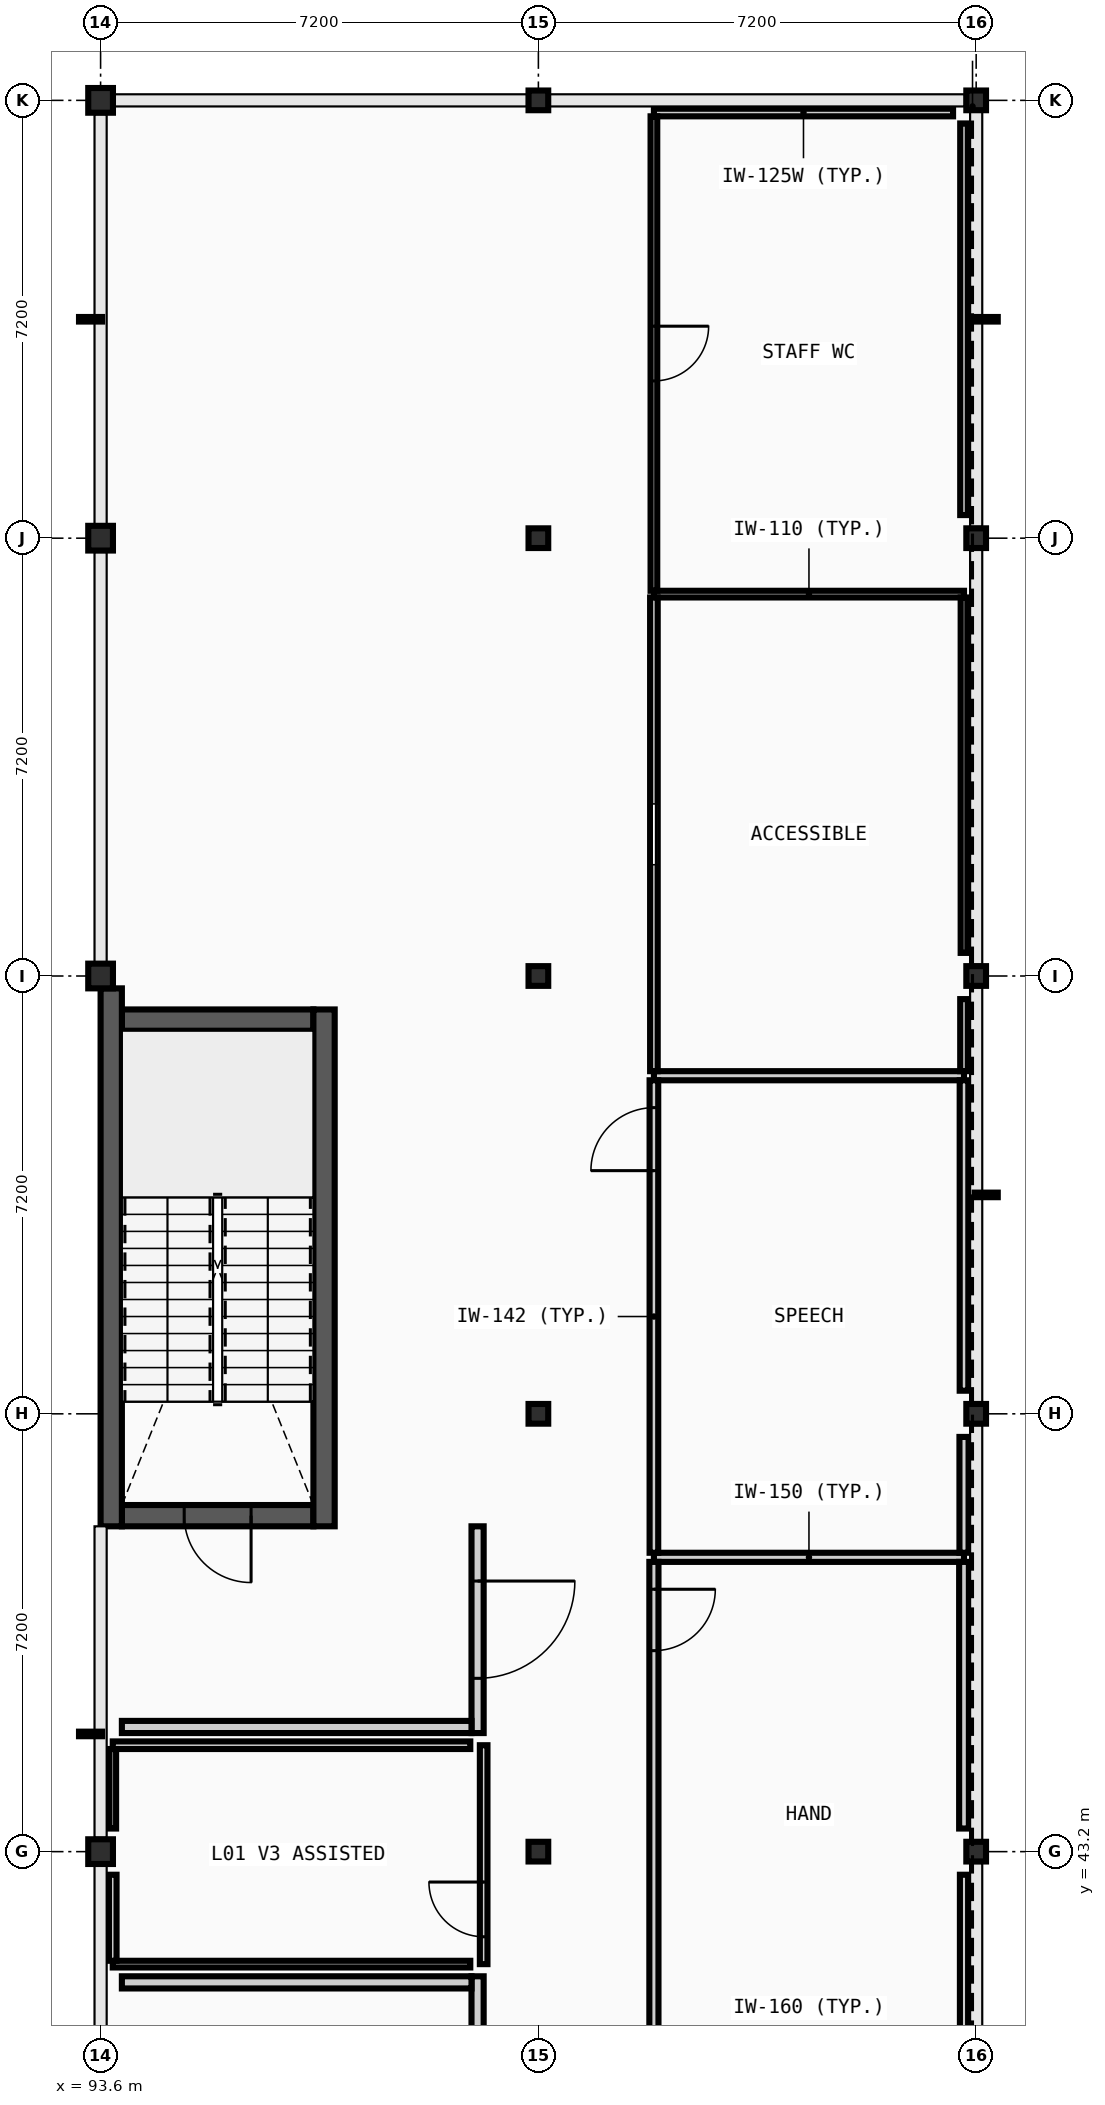
"""IFC4 building model, lengths in metres.
Left out: names, types, materials, properties, quantities, classifications, styles, units other than length and angle.
Written with IfcOpenShell. Run it as: python <this file> out.ifc"""

import sys

from ifc_helpers import new_model, si_unit, direction, frame, frame_2d, origin, origin_2d, place, context, subcontext, project, spatial, rectangle, hollow_circle, extrude, element, fill, save


model = new_model("IFC4")
c1 = context("Model", 3, precision=1e-05, world=origin(), true_north=direction((0.0, 1.0)))
c2 = subcontext(c1, "Body", "Model", "MODEL_VIEW")
j1 = project(units=[si_unit("LENGTHUNIT", "METRE"), si_unit("PLANEANGLEUNIT", "RADIAN")], contexts=[c1])
p1 = place(None, origin())
s1 = spatial("IfcSite", under=j1, at=p1, CompositionType="ELEMENT")
p2 = place(p1, origin())
s2 = spatial("IfcBuilding", under=s1, at=p2, CompositionType="ELEMENT")
p3 = place(p2, frame((0.0, 0.0, 5.2)))
s3 = spatial("IfcBuildingStorey", under=s2, at=p3, CompositionType="ELEMENT", Elevation=5.2)
for number, where, z_axis, x_axis in (
    (1, (93.6, 43.2, 0.0), (0.0, 0.0, 1.0), (1.0, 0.0, 0.0)),
    (2, (93.6, 57.6, 0.0), (0.0, 0.0, 1.0), (1.0, 0.0, 0.0)),
    (3, (93.6, 64.8, 0.0), (0.0, 0.0, 1.0), (1.0, 0.0, 0.0)),
    (4, (93.6, 72.0, 0.0), (0.0, 0.0, 1.0), (1.0, 0.0, 0.0)),
):
    element("IfcColumn", number, at=place(p3, frame(where, z_axis=z_axis, x_axis=x_axis)), inside=s3, PredefinedType="COLUMN", context=c2, shape_type="SweptSolid", body=[
        extrude(hollow_circle(Radius=0.203, WallThickness=0.016, at=origin_2d()), origin(), (0.0, 0.0, 1.0), 4.4),
    ])
for number, where, z_axis, x_axis in (
    (5, (100.8, 43.2, 0.0), (0.0, 0.0, 1.0), (1.0, 0.0, 0.0)),
    (6, (100.8, 50.4, 0.0), (0.0, 0.0, 1.0), (1.0, 0.0, 0.0)),
    (7, (100.8, 57.6, 0.0), (0.0, 0.0, 1.0), (1.0, 0.0, 0.0)),
    (8, (100.8, 64.8, 0.0), (0.0, 0.0, 1.0), (1.0, 0.0, 0.0)),
    (9, (100.8, 72.0, 0.0), (0.0, 0.0, 1.0), (1.0, 0.0, 0.0)),
    (10, (108.0, 43.2, 0.0), (0.0, 0.0, 1.0), (1.0, 0.0, 0.0)),
    (11, (108.0, 50.4, 0.0), (0.0, 0.0, 1.0), (1.0, 0.0, 0.0)),
    (12, (108.0, 57.6, 0.0), (0.0, 0.0, 1.0), (1.0, 0.0, 0.0)),
    (13, (108.0, 64.8, 0.0), (0.0, 0.0, 1.0), (1.0, 0.0, 0.0)),
    (14, (108.0, 72.0, 0.0), (0.0, 0.0, 1.0), (1.0, 0.0, 0.0)),
):
    element("IfcColumn", number, at=place(p3, frame(where, z_axis=z_axis, x_axis=x_axis)), inside=s3, PredefinedType="COLUMN", context=c2, shape_type="SweptSolid", body=[
        extrude(hollow_circle(Radius=0.162, WallThickness=0.012, at=origin_2d()), origin(), (0.0, 0.0, 1.0), 4.4),
    ])
p4 = place(p3, frame((99.8, 37.75, 0.0), z_axis=(0.0, 0.0, 1.0), x_axis=(0.0, 1.0, 0.0)))
e15 = element("IfcWall", 15, at=p4, inside=s3, PredefinedType="PARTITIONING", context=c2, shape_type="SweptSolid", body=[
    extrude(rectangle(XDim=3.4, YDim=0.2, at=frame_2d((1.7, 0.0))), origin(), (0.0, 0.0, 1.0), 4.185),
])
p5 = place(p4, frame((0.9, 0.0, 0.0)))
e16 = element("IfcOpeningElement", 16, at=p5, cuts=e15, PredefinedType="OPENING", context=c2, shape_type="SweptSolid", body=[
    extrude(rectangle(XDim=1.6, YDim=2.2, at=frame_2d((0.8, 1.1))), frame((0.0, 0.11, 0.0), z_axis=(0.0, -1.0, 0.0), x_axis=(1.0, 0.0, 0.0)), (0.0, 0.0, 1.0), 0.22),
])
p6 = place(p3, frame((93.95, 41.05, 0.0), z_axis=(0.0, 0.0, 1.0), x_axis=(1.0, 0.0, 0.0)))
e17 = element("IfcWall", 17, at=p6, inside=s3, PredefinedType="PARTITIONING", context=c2, shape_type="SweptSolid", body=[
    extrude(rectangle(XDim=5.75, YDim=0.2, at=frame_2d((2.875, 0.0))), origin(), (0.0, 0.0, 1.0), 4.185),
])
p7 = place(p3, frame((93.95, 48.725, 0.0), z_axis=(0.0, 0.0, 1.0), x_axis=(1.0, 0.0, 0.0)))
e18 = element("IfcWall", 18, at=p7, inside=s3, PredefinedType="SHEAR", context=c2, shape_type="SweptSolid", body=[
    extrude(rectangle(XDim=3.15, YDim=0.35, at=frame_2d((1.575, 0.0))), origin(), (0.0, 0.0, 1.0), 4.185),
])
p8 = place(p7, frame((1.025, 0.0, 0.0)))
e19 = element("IfcOpeningElement", 19, at=p8, cuts=e18, PredefinedType="OPENING", context=c2, shape_type="SweptSolid", body=[
    extrude(rectangle(XDim=1.1, YDim=2.15, at=frame_2d((0.55, 1.075))), frame((0.0, 0.185, 0.0), z_axis=(0.0, -1.0, 0.0), x_axis=(1.0, 0.0, 0.0)), (0.0, 0.0, 1.0), 0.37),
])
p9 = place(p3, frame((93.95, 56.875, 0.0), z_axis=(0.0, 0.0, 1.0), x_axis=(1.0, 0.0, 0.0)))
e20 = element("IfcWall", 20, at=p9, inside=s3, PredefinedType="SHEAR", context=c2, shape_type="SweptSolid", body=[
    extrude(rectangle(XDim=3.15, YDim=0.35, at=frame_2d((1.575, 0.0))), origin(), (0.0, 0.0, 1.0), 4.185),
])
p10 = place(p3, frame((93.775, 48.55, 0.0), z_axis=(0.0, 0.0, 1.0), x_axis=(0.0, 1.0, 0.0)))
e21 = element("IfcWall", 21, at=p10, inside=s3, PredefinedType="SHEAR", context=c2, shape_type="SweptSolid", body=[
    extrude(rectangle(XDim=8.847, YDim=0.35, at=frame_2d((4.423, 0.0))), origin(), (0.0, 0.0, 1.0), 4.185),
])
p11 = place(p3, frame((97.275, 48.55, 0.0), z_axis=(0.0, 0.0, 1.0), x_axis=(0.0, 1.0, 0.0)))
e22 = element("IfcWall", 22, at=p11, inside=s3, PredefinedType="SHEAR", context=c2, shape_type="SweptSolid", body=[
    extrude(rectangle(XDim=8.5, YDim=0.35, at=frame_2d((4.25, 0.0))), origin(), (0.0, 0.0, 1.0), 4.185),
])
p12 = place(p3, frame((99.8, 45.15, 0.0), z_axis=(0.0, 0.0, 1.0), x_axis=(0.0, 1.0, 0.0)))
e23 = element("IfcWall", 23, at=p12, inside=s3, PredefinedType="PARTITIONING", context=c2, shape_type="SweptSolid", body=[
    extrude(rectangle(XDim=3.4, YDim=0.2, at=frame_2d((1.7, 0.0))), origin(), (0.0, 0.0, 1.0), 4.185),
])
p13 = place(p12, frame((0.9, 0.0, 0.0)))
e24 = element("IfcOpeningElement", 24, at=p13, cuts=e23, PredefinedType="OPENING", context=c2, shape_type="SweptSolid", body=[
    extrude(rectangle(XDim=1.6, YDim=2.2, at=frame_2d((0.8, 1.1))), frame((0.0, 0.11, 0.0), z_axis=(0.0, -1.0, 0.0), x_axis=(1.0, 0.0, 0.0)), (0.0, 0.0, 1.0), 0.22),
])
p14 = place(p3, frame((93.95, 45.25, 0.0), z_axis=(0.0, 0.0, 1.0), x_axis=(1.0, 0.0, 0.0)))
e25 = element("IfcWall", 25, at=p14, inside=s3, PredefinedType="PARTITIONING", context=c2, shape_type="SweptSolid", body=[
    extrude(rectangle(XDim=5.75, YDim=0.2, at=frame_2d((2.875, 0.0))), origin(), (0.0, 0.0, 1.0), 4.185),
])
p15 = place(p3, frame((93.8, 41.35, 0.0), z_axis=(0.0, 0.0, 1.0), x_axis=(1.0, 0.0, 0.0)))
e26 = element("IfcWall", 26, at=p15, inside=s3, PredefinedType="PARTITIONING", context=c2, shape_type="SweptSolid", body=[
    extrude(rectangle(XDim=5.88, YDim=0.11, at=frame_2d((2.94, 0.0))), origin(), (0.0, 0.0, 1.0), 4.185),
])
p16 = place(p3, frame((93.8, 44.95, 0.0), z_axis=(0.0, 0.0, 1.0), x_axis=(1.0, 0.0, 0.0)))
e27 = element("IfcWall", 27, at=p16, inside=s3, PredefinedType="PARTITIONING", context=c2, shape_type="SweptSolid", body=[
    extrude(rectangle(XDim=5.88, YDim=0.125, at=frame_2d((2.94, 0.0))), origin(), (0.0, 0.0, 1.0), 4.185),
])
for number, where, z_axis, x_axis in (
    (28, (102.7, 48.04, 0.0), (0.0, 0.0, 1.0), (1.0, 0.0, 0.0)),
    (29, (102.7, 55.96, 0.0), (0.0, 0.0, 1.0), (1.0, 0.0, 0.0)),
):
    element("IfcWall", number, at=place(p3, frame(where, z_axis=z_axis, x_axis=x_axis)), inside=s3, PredefinedType="PARTITIONING", context=c2, shape_type="SweptSolid", body=[
        extrude(rectangle(XDim=5.1, YDim=0.15, at=frame_2d((2.55, 0.0))), origin(), (0.0, 0.0, 1.0), 4.185),
    ])
p17 = place(p3, frame((102.7, 63.88, 0.0), z_axis=(0.0, 0.0, 1.0), x_axis=(1.0, 0.0, 0.0)))
e30 = element("IfcWall", 30, at=p17, inside=s3, PredefinedType="PARTITIONING", context=c2, shape_type="SweptSolid", body=[
    extrude(rectangle(XDim=5.1, YDim=0.11, at=frame_2d((2.55, 0.0))), origin(), (0.0, 0.0, 1.0), 4.185),
])
p18 = place(p3, frame((102.7, 71.8, 0.0), z_axis=(0.0, 0.0, 1.0), x_axis=(1.0, 0.0, 0.0)))
e31 = element("IfcWall", 31, at=p18, inside=s3, PredefinedType="PARTITIONING", context=c2, shape_type="SweptSolid", body=[
    extrude(rectangle(XDim=4.92, YDim=0.125, at=frame_2d((2.46, 0.0))), origin(), (0.0, 0.0, 1.0), 4.185),
])
p19 = place(p3, frame((93.8, 41.405, 0.0), z_axis=(0.0, 0.0, 1.0), x_axis=(0.0, 1.0, 0.0)))
e32 = element("IfcWall", 32, at=p19, inside=s3, PredefinedType="PARTITIONING", context=c2, shape_type="SweptSolid", body=[
    extrude(rectangle(XDim=1.415, YDim=0.125, at=frame_2d((0.708, 0.0))), origin(), (0.0, 0.0, 1.0), 4.185),
])
p20 = place(p3, frame((93.8, 43.58, 0.0), z_axis=(0.0, 0.0, 1.0), x_axis=(0.0, 1.0, 0.0)))
e33 = element("IfcWall", 33, at=p20, inside=s3, PredefinedType="PARTITIONING", context=c2, shape_type="SweptSolid", body=[
    extrude(rectangle(XDim=1.307, YDim=0.11, at=frame_2d((0.654, 0.0))), origin(), (0.0, 0.0, 1.0), 4.185),
])
p21 = place(p3, frame((99.9, 41.35, 0.0), z_axis=(0.0, 0.0, 1.0), x_axis=(0.0, 1.0, 0.0)))
e34 = element("IfcWall", 34, at=p21, inside=s3, PredefinedType="PARTITIONING", context=c2, shape_type="SweptSolid", body=[
    extrude(rectangle(XDim=3.6, YDim=0.125, at=frame_2d((1.8, 0.0))), origin(), (0.0, 0.0, 1.0), 4.185),
])
p22 = place(p21, frame((0.45, 0.0, 0.0)))
e35 = element("IfcOpeningElement", 35, at=p22, cuts=e34, PredefinedType="OPENING", context=c2, shape_type="SweptSolid", body=[
    extrude(rectangle(XDim=0.9, YDim=2.1, at=frame_2d((0.45, 1.05))), frame((0.0, 0.073, 0.0), z_axis=(0.0, -1.0, 0.0), x_axis=(1.0, 0.0, 0.0)), (0.0, 0.0, 1.0), 0.145),
])
p23 = place(p3, frame((102.7, 39.65, 0.0), z_axis=(0.0, 0.0, 1.0), x_axis=(0.0, 1.0, 0.0)))
e36 = element("IfcWall", 36, at=p23, inside=s3, PredefinedType="PARTITIONING", context=c2, shape_type="SweptSolid", body=[
    extrude(rectangle(XDim=8.315, YDim=0.15, at=frame_2d((4.158, 0.0))), origin(), (0.0, 0.0, 1.0), 4.185),
])
p24 = place(p23, frame((6.855, 0.0, 0.0)))
e37 = element("IfcOpeningElement", 37, at=p24, cuts=e36, PredefinedType="OPENING", context=c2, shape_type="SweptSolid", body=[
    extrude(rectangle(XDim=1.01, YDim=2.124, at=frame_2d((0.505, 1.062))), frame((0.0, 0.085, 0.0), z_axis=(0.0, -1.0, 0.0), x_axis=(1.0, 0.0, 0.0)), (0.0, 0.0, 1.0), 0.17),
])
p25 = place(p3, frame((102.7, 48.115, 0.0), z_axis=(0.0, 0.0, 1.0), x_axis=(0.0, 1.0, 0.0)))
e38 = element("IfcWall", 38, at=p25, inside=s3, PredefinedType="PARTITIONING", context=c2, shape_type="SweptSolid", body=[
    extrude(rectangle(XDim=7.77, YDim=0.142, at=frame_2d((3.885, 0.0))), origin(), (0.0, 0.0, 1.0), 4.185),
])
p26 = place(p25, frame((6.284, 0.0, 0.0)))
e39 = element("IfcOpeningElement", 39, at=p26, cuts=e38, PredefinedType="OPENING", context=c2, shape_type="SweptSolid", body=[
    extrude(rectangle(XDim=1.036, YDim=2.124, at=frame_2d((0.518, 1.062))), frame((0.0, 0.081, 0.0), z_axis=(0.0, -1.0, 0.0), x_axis=(1.0, 0.0, 0.0)), (0.0, 0.0, 1.0), 0.162),
])
p27 = place(p3, frame((102.7, 56.035, 0.0), z_axis=(0.0, 0.0, 1.0), x_axis=(0.0, 1.0, 0.0)))
e40 = element("IfcWall", 40, at=p27, inside=s3, PredefinedType="PARTITIONING", context=c2, shape_type="SweptSolid", body=[
    extrude(rectangle(XDim=7.79, YDim=0.125, at=frame_2d((3.895, 0.0))), origin(), (0.0, 0.0, 1.0), 4.185),
])
p28 = place(p27, frame((3.395, 0.0, 0.0)))
e41 = element("IfcOpeningElement", 41, at=p28, cuts=e40, PredefinedType="OPENING", context=c2, shape_type="SweptSolid", body=[
    extrude(rectangle(XDim=1.0, YDim=2.1, at=frame_2d((0.5, 1.05))), frame((0.0, 0.073, 0.0), z_axis=(0.0, -1.0, 0.0), x_axis=(1.0, 0.0, 0.0)), (0.0, 0.0, 1.0), 0.145),
])
p29 = place(p3, frame((102.7, 63.935, 0.0), z_axis=(0.0, 0.0, 1.0), x_axis=(0.0, 1.0, 0.0)))
e42 = element("IfcWall", 42, at=p29, inside=s3, PredefinedType="PARTITIONING", context=c2, shape_type="SweptSolid", body=[
    extrude(rectangle(XDim=7.802, YDim=0.11, at=frame_2d((3.901, 0.0))), origin(), (0.0, 0.0, 1.0), 4.185),
])
p30 = place(p29, frame((3.451, 0.0, 0.0)))
e43 = element("IfcOpeningElement", 43, at=p30, cuts=e42, PredefinedType="OPENING", context=c2, shape_type="SweptSolid", body=[
    extrude(rectangle(XDim=0.9, YDim=2.1, at=frame_2d((0.45, 1.05))), frame((0.0, 0.065, 0.0), z_axis=(0.0, -1.0, 0.0), x_axis=(1.0, 0.0, 0.0)), (0.0, 0.0, 1.0), 0.13),
])
p31 = place(p3, frame((107.8, 39.65, 0.0), z_axis=(0.0, 0.0, 1.0), x_axis=(0.0, 1.0, 0.0)))
e44 = element("IfcWall", 44, at=p31, inside=s3, PredefinedType="PARTITIONING", context=c2, shape_type="SweptSolid", body=[
    extrude(rectangle(XDim=3.17, YDim=0.135, at=frame_2d((1.585, 0.0))), origin(), (0.0, 0.0, 1.0), 3.81),
])
p32 = place(p3, frame((107.8, 43.58, 0.0), z_axis=(0.0, 0.0, 1.0), x_axis=(0.0, 1.0, 0.0)))
e45 = element("IfcWall", 45, at=p32, inside=s3, PredefinedType="PARTITIONING", context=c2, shape_type="SweptSolid", body=[
    extrude(rectangle(XDim=4.385, YDim=0.16, at=frame_2d((2.192, 0.0))), origin(), (0.0, 0.0, 1.0), 3.81),
])
p33 = place(p3, frame((107.8, 48.115, 0.0), z_axis=(0.0, 0.0, 1.0), x_axis=(0.0, 1.0, 0.0)))
e46 = element("IfcWall", 46, at=p33, inside=s3, PredefinedType="PARTITIONING", context=c2, shape_type="SweptSolid", body=[
    extrude(rectangle(XDim=1.905, YDim=0.15, at=frame_2d((0.953, 0.0))), origin(), (0.0, 0.0, 1.0), 3.81),
])
p34 = place(p3, frame((107.8, 50.78, 0.0), z_axis=(0.0, 0.0, 1.0), x_axis=(0.0, 1.0, 0.0)))
e47 = element("IfcWall", 47, at=p34, inside=s3, PredefinedType="PARTITIONING", context=c2, shape_type="SweptSolid", body=[
    extrude(rectangle(XDim=5.105, YDim=0.142, at=frame_2d((2.552, 0.0))), origin(), (0.0, 0.0, 1.0), 3.81),
])
p35 = place(p3, frame((107.8, 56.035, 0.0), z_axis=(0.0, 0.0, 1.0), x_axis=(0.0, 1.0, 0.0)))
e48 = element("IfcWall", 48, at=p35, inside=s3, PredefinedType="PARTITIONING", context=c2, shape_type="SweptSolid", body=[
    extrude(rectangle(XDim=1.185, YDim=0.125, at=frame_2d((0.593, 0.0))), origin(), (0.0, 0.0, 1.0), 3.81),
])
p36 = place(p3, frame((107.8, 57.98, 0.0), z_axis=(0.0, 0.0, 1.0), x_axis=(0.0, 1.0, 0.0)))
e49 = element("IfcWall", 49, at=p36, inside=s3, PredefinedType="PARTITIONING", context=c2, shape_type="SweptSolid", body=[
    extrude(rectangle(XDim=5.845, YDim=0.11, at=frame_2d((2.922, 0.0))), origin(), (0.0, 0.0, 1.0), 4.185),
])
p37 = place(p3, frame((107.8, 65.18, 0.0), z_axis=(0.0, 0.0, 1.0), x_axis=(0.0, 1.0, 0.0)))
e50 = element("IfcWall", 50, at=p37, inside=s3, PredefinedType="PARTITIONING", context=c2, shape_type="SweptSolid", body=[
    extrude(rectangle(XDim=6.44, YDim=0.125, at=frame_2d((3.22, 0.0))), origin(), (0.0, 0.0, 1.0), 4.185),
])
p38 = place(p8, origin())
e51 = element("IfcDoor", 51, at=p38, inside=s3, OperationType="SINGLE_SWING_RIGHT", PredefinedType="DOOR", context=c2, shape_type="SweptSolid", body=[
    extrude(rectangle(XDim=1.1, YDim=2.15, at=frame_2d((0.55, 1.075))), frame((0.0, 0.025, 0.0), z_axis=(0.0, -1.0, 0.0), x_axis=(1.0, 0.0, 0.0)), (0.0, 0.0, 1.0), 0.05),
])
fill(e19, e51)
p39 = place(p13, origin())
e52 = element("IfcDoor", 52, at=p39, inside=s3, OperationType="DOUBLE_DOOR_SINGLE_SWING", PredefinedType="DOOR", context=c2, shape_type="SweptSolid", body=[
    extrude(rectangle(XDim=1.6, YDim=2.2, at=frame_2d((0.8, 1.1))), frame((0.0, 0.025, 0.0), z_axis=(0.0, -1.0, 0.0), x_axis=(1.0, 0.0, 0.0)), (0.0, 0.0, 1.0), 0.05),
])
fill(e24, e52)
p40 = place(p24, origin())
e53 = element("IfcDoor", 53, at=p40, inside=s3, OperationType="SINGLE_SWING_RIGHT", PredefinedType="DOOR", context=c2, shape_type="SweptSolid", body=[
    extrude(rectangle(XDim=1.01, YDim=2.124, at=frame_2d((0.505, 1.062))), frame((0.0, 0.025, 0.0), z_axis=(0.0, -1.0, 0.0), x_axis=(1.0, 0.0, 0.0)), (0.0, 0.0, 1.0), 0.05),
])
fill(e37, e53)
p41 = place(p26, origin())
e54 = element("IfcDoor", 54, at=p41, inside=s3, OperationType="SINGLE_SWING_LEFT", PredefinedType="DOOR", context=c2, shape_type="SweptSolid", body=[
    extrude(rectangle(XDim=1.036, YDim=2.124, at=frame_2d((0.518, 1.062))), frame((0.0, 0.025, 0.0), z_axis=(0.0, -1.0, 0.0), x_axis=(1.0, 0.0, 0.0)), (0.0, 0.0, 1.0), 0.05),
])
fill(e39, e54)
p42 = place(p28, origin())
e55 = element("IfcDoor", 55, at=p42, inside=s3, OperationType="SLIDING_TO_LEFT", PredefinedType="DOOR", context=c2, shape_type="SweptSolid", body=[
    extrude(rectangle(XDim=1.0, YDim=2.1, at=frame_2d((0.5, 1.05))), frame((0.0, 0.025, 0.0), z_axis=(0.0, -1.0, 0.0), x_axis=(1.0, 0.0, 0.0)), (0.0, 0.0, 1.0), 0.05),
])
fill(e41, e55)
p43 = place(p30, origin())
e56 = element("IfcDoor", 56, at=p43, inside=s3, OperationType="SINGLE_SWING_RIGHT", PredefinedType="DOOR", context=c2, shape_type="SweptSolid", body=[
    extrude(rectangle(XDim=0.9, YDim=2.1, at=frame_2d((0.45, 1.05))), frame((0.0, 0.025, 0.0), z_axis=(0.0, -1.0, 0.0), x_axis=(1.0, 0.0, 0.0)), (0.0, 0.0, 1.0), 0.05),
])
fill(e43, e56)
p44 = place(p22, frame((0.9, 0.0, 0.0), z_axis=(0.0, 0.0, 1.0), x_axis=(-1.0, 0.0, 0.0)))
e57 = element("IfcDoor", 57, at=p44, inside=s3, OperationType="SINGLE_SWING_RIGHT", PredefinedType="DOOR", context=c2, shape_type="SweptSolid", body=[
    extrude(rectangle(XDim=0.9, YDim=2.1, at=frame_2d((0.45, 1.05))), frame((0.0, 0.025, 0.0), z_axis=(0.0, -1.0, 0.0), x_axis=(1.0, 0.0, 0.0)), (0.0, 0.0, 1.0), 0.05),
])
fill(e35, e57)
save(model, sys.argv[1])
